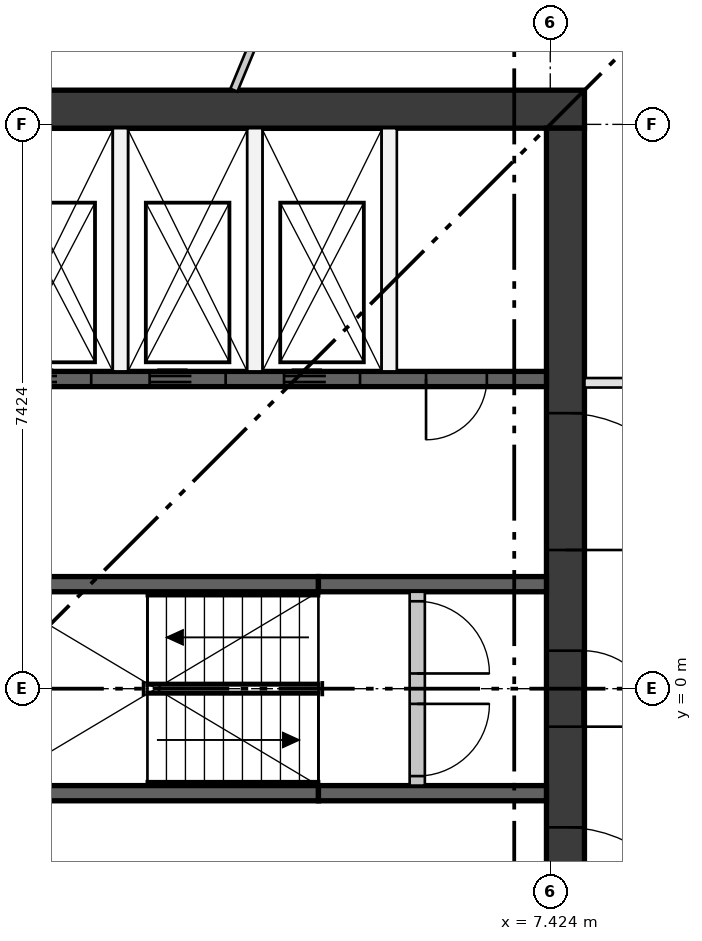
"""IFC4 building model, lengths in metres.
Left out: names, types, materials, properties, quantities, classifications, styles, units other than length and angle.
Written with IfcOpenShell. Run it as: python <this file> out.ifc"""

import sys

from ifc_helpers import new_model, si_unit, direction, frame, frame_2d, origin, place, context, subcontext, project, spatial, rectangle, extrude, element, fill, save


model = new_model("IFC4")
c1 = context("Model", 3, precision=1e-05, world=origin(), true_north=direction((0.0, 1.0)))
c2 = subcontext(c1, "Body", "Model", "MODEL_VIEW")
j1 = project(units=[si_unit("LENGTHUNIT", "METRE"), si_unit("PLANEANGLEUNIT", "RADIAN")], contexts=[c1])
p1 = place(None, origin())
s1 = spatial("IfcSite", under=j1, at=p1, CompositionType="ELEMENT")
p2 = place(p1, origin())
s2 = spatial("IfcBuilding", under=s1, at=p2, CompositionType="ELEMENT")
p3 = place(p2, frame((0.0, 0.0, 174.25)))
s3 = spatial("IfcBuildingStorey", under=s2, at=p3, CompositionType="ELEMENT", Elevation=174.25)
p4 = place(p3, frame((-7.874, 7.624, 0.0), z_axis=(0.0, 0.0, 1.0), x_axis=(1.0, 0.0, 0.0)))
e1 = element("IfcWall", 1, at=p4, inside=s3, PredefinedType="SHEAR", context=c2, shape_type="SweptSolid", body=[
    extrude(rectangle(XDim=15.748, YDim=0.5, at=frame_2d((7.874, 0.0))), origin(), (0.0, 0.0, 1.0), 3.35),
])
p5 = place(p3, frame((7.624, -7.374, 0.0), z_axis=(0.0, 0.0, 1.0), x_axis=(0.0, 1.0, 0.0)))
e2 = element("IfcWall", 2, at=p5, inside=s3, PredefinedType="SHEAR", context=c2, shape_type="SweptSolid", body=[
    extrude(rectangle(XDim=14.748, YDim=0.5, at=frame_2d((7.374, 0.0))), origin(), (0.0, 0.0, 1.0), 3.35),
])
p6 = place(p5, frame((6.874, 0.0, 0.0)))
e3 = element("IfcOpeningElement", 3, at=p6, cuts=e2, PredefinedType="OPENING", context=c2, shape_type="SweptSolid", body=[
    extrude(rectangle(XDim=1.0, YDim=2.1, at=frame_2d((0.5, 1.05))), frame((0.0, 0.26, 0.0), z_axis=(0.0, -1.0, 0.0), x_axis=(1.0, 0.0, 0.0)), (0.0, 0.0, 1.0), 0.52),
])
p7 = place(p5, frame((3.75, 0.0, 0.0)))
e4 = element("IfcOpeningElement", 4, at=p7, cuts=e2, PredefinedType="OPENING", context=c2, shape_type="SweptSolid", body=[
    extrude(rectangle(XDim=1.8, YDim=2.1, at=frame_2d((0.9, 1.05))), frame((0.0, 0.26, 0.0), z_axis=(0.0, -1.0, 0.0), x_axis=(1.0, 0.0, 0.0)), (0.0, 0.0, 1.0), 0.52),
])
p8 = place(p5, frame((9.198, 0.0, 0.0)))
e5 = element("IfcOpeningElement", 5, at=p8, cuts=e2, PredefinedType="OPENING", context=c2, shape_type="SweptSolid", body=[
    extrude(rectangle(XDim=1.8, YDim=2.1, at=frame_2d((0.9, 1.05))), frame((0.0, 0.26, 0.0), z_axis=(0.0, -1.0, 0.0), x_axis=(1.0, 0.0, 0.0)), (0.0, 0.0, 1.0), 0.52),
])
p9 = place(p3, frame((0.0, 4.074, 0.0), z_axis=(0.0, 0.0, 1.0), x_axis=(1.0, 0.0, 0.0)))
e6 = element("IfcWall", 6, at=p9, inside=s3, PredefinedType="SHEAR", context=c2, shape_type="SweptSolid", body=[
    extrude(rectangle(XDim=7.374, YDim=0.2, at=frame_2d((3.687, 0.0))), origin(), (0.0, 0.0, 1.0), 3.0),
])
p10 = place(p9, frame((0.384, 0.0, 0.0)))
e7 = element("IfcOpeningElement", 7, at=p10, cuts=e6, PredefinedType="OPENING", context=c2, shape_type="SweptSolid", body=[
    extrude(rectangle(XDim=1.0, YDim=2.1, at=frame_2d((0.5, 1.05))), frame((0.0, 0.11, 0.0), z_axis=(0.0, -1.0, 0.0), x_axis=(1.0, 0.0, 0.0)), (0.0, 0.0, 1.0), 0.22),
])
p11 = place(p9, frame((2.153, 0.0, 0.0)))
e8 = element("IfcOpeningElement", 8, at=p11, cuts=e6, PredefinedType="OPENING", context=c2, shape_type="SweptSolid", body=[
    extrude(rectangle(XDim=1.0, YDim=2.1, at=frame_2d((0.5, 1.05))), frame((0.0, 0.11, 0.0), z_axis=(0.0, -1.0, 0.0), x_axis=(1.0, 0.0, 0.0)), (0.0, 0.0, 1.0), 0.22),
])
p12 = place(p9, frame((3.921, 0.0, 0.0)))
e9 = element("IfcOpeningElement", 9, at=p12, cuts=e6, PredefinedType="OPENING", context=c2, shape_type="SweptSolid", body=[
    extrude(rectangle(XDim=1.0, YDim=2.1, at=frame_2d((0.5, 1.05))), frame((0.0, 0.11, 0.0), z_axis=(0.0, -1.0, 0.0), x_axis=(1.0, 0.0, 0.0)), (0.0, 0.0, 1.0), 0.22),
])
p13 = place(p9, frame((5.79, 0.0, 0.0)))
e10 = element("IfcOpeningElement", 10, at=p13, cuts=e6, PredefinedType="OPENING", context=c2, shape_type="SweptSolid", body=[
    extrude(rectangle(XDim=0.8, YDim=2.1, at=frame_2d((0.4, 1.05))), frame((0.0, 0.11, 0.0), z_axis=(0.0, -1.0, 0.0), x_axis=(1.0, 0.0, 0.0)), (0.0, 0.0, 1.0), 0.22),
])
p14 = place(p3, frame((0.0, -1.375, 0.0), z_axis=(0.0, 0.0, 1.0), x_axis=(1.0, 0.0, 0.0)))
e11 = element("IfcWall", 11, at=p14, inside=s3, PredefinedType="SHEAR", context=c2, shape_type="SweptSolid", body=[
    extrude(rectangle(XDim=4.374, YDim=0.2, at=frame_2d((2.187, 0.0))), origin(), (0.0, 0.0, 1.0), 3.0),
])
p15 = place(p3, frame((4.374, -1.375, 0.0), z_axis=(0.0, 0.0, 1.0), x_axis=(1.0, 0.0, 0.0)))
e12 = element("IfcWall", 12, at=p15, inside=s3, PredefinedType="SHEAR", context=c2, shape_type="SweptSolid", body=[
    extrude(rectangle(XDim=3.0, YDim=0.2, at=frame_2d((1.5, 0.0))), origin(), (0.0, 0.0, 1.0), 3.0),
])
p16 = place(p3, frame((0.0, 1.375, 0.0), z_axis=(0.0, 0.0, 1.0), x_axis=(1.0, 0.0, 0.0)))
e13 = element("IfcWall", 13, at=p16, inside=s3, PredefinedType="SHEAR", context=c2, shape_type="SweptSolid", body=[
    extrude(rectangle(XDim=4.374, YDim=0.2, at=frame_2d((2.187, 0.0))), origin(), (0.0, 0.0, 1.0), 3.0),
])
p17 = place(p3, frame((4.374, 1.375, 0.0), z_axis=(0.0, 0.0, 1.0), x_axis=(1.0, 0.0, 0.0)))
e14 = element("IfcWall", 14, at=p17, inside=s3, PredefinedType="SHEAR", context=c2, shape_type="SweptSolid", body=[
    extrude(rectangle(XDim=3.0, YDim=0.2, at=frame_2d((1.5, 0.0))), origin(), (0.0, 0.0, 1.0), 3.0),
])
for number, where, z_axis, x_axis in (
    (15, (1.769, 4.174, 0.0), (0.0, 0.0, 1.0), (0.0, 1.0, 0.0)),
    (16, (3.537, 4.174, 0.0), (0.0, 0.0, 1.0), (0.0, 1.0, 0.0)),
    (17, (5.305, 4.174, 0.0), (0.0, 0.0, 1.0), (0.0, 1.0, 0.0)),
):
    element("IfcWall", number, at=place(p3, frame(where, z_axis=z_axis, x_axis=x_axis)), inside=s3, PredefinedType="PARTITIONING", context=c2, shape_type="SweptSolid", body=[
        extrude(rectangle(XDim=3.2, YDim=0.2, at=frame_2d((1.6, 0.0))), origin(), (0.0, 0.0, 1.0), 3.0),
    ])
p18 = place(p3, frame((5.674, -1.275, 0.0), z_axis=(0.0, 0.0, 1.0), x_axis=(0.0, 1.0, 0.0)))
e18 = element("IfcWall", 18, at=p18, inside=s3, PredefinedType="PARTITIONING", context=c2, shape_type="SweptSolid", body=[
    extrude(rectangle(XDim=2.55, YDim=0.2, at=frame_2d((1.275, 0.0))), origin(), (0.0, 0.0, 1.0), 3.0),
])
p19 = place(p18, frame((0.125, 0.0, 0.0)))
e19 = element("IfcOpeningElement", 19, at=p19, cuts=e18, PredefinedType="OPENING", context=c2, shape_type="SweptSolid", body=[
    extrude(rectangle(XDim=0.95, YDim=2.1, at=frame_2d((0.475, 1.05))), frame((0.0, 0.11, 0.0), z_axis=(0.0, -1.0, 0.0), x_axis=(1.0, 0.0, 0.0)), (0.0, 0.0, 1.0), 0.22),
])
p20 = place(p18, frame((1.475, 0.0, 0.0)))
e20 = element("IfcOpeningElement", 20, at=p20, cuts=e18, PredefinedType="OPENING", context=c2, shape_type="SweptSolid", body=[
    extrude(rectangle(XDim=0.95, YDim=2.1, at=frame_2d((0.475, 1.05))), frame((0.0, 0.11, 0.0), z_axis=(0.0, -1.0, 0.0), x_axis=(1.0, 0.0, 0.0)), (0.0, 0.0, 1.0), 0.22),
])
p21 = place(p3, frame((7.874, 4.024, 0.0), z_axis=(0.0, 0.0, 1.0), x_axis=(1.0, 0.0, 0.0)))
e21 = element("IfcWall", 21, at=p21, inside=s3, PredefinedType="PARTITIONING", context=c2, shape_type="SweptSolid", body=[
    extrude(rectangle(XDim=4.741, YDim=0.125, at=frame_2d((2.37, 0.0))), origin(), (0.0, 0.0, 1.0), 3.0),
])
p22 = place(p21, frame((1.5, 0.0, 0.0)))
e22 = element("IfcOpeningElement", 22, at=p22, cuts=e21, PredefinedType="OPENING", context=c2, shape_type="SweptSolid", body=[
    extrude(rectangle(XDim=1.8, YDim=2.1, at=frame_2d((0.9, 1.05))), frame((0.0, 0.073, 0.0), z_axis=(0.0, -1.0, 0.0), x_axis=(1.0, 0.0, 0.0)), (0.0, 0.0, 1.0), 0.145),
])
p23 = place(p3, frame((3.261, 7.874, 0.0), z_axis=(0.0, 0.0, 1.0), x_axis=(0.382690105068, 0.923876768559, 0.0)))
e23 = element("IfcWall", 23, at=p23, inside=s3, PredefinedType="PARTITIONING", context=c2, shape_type="SweptSolid", body=[
    extrude(rectangle(XDim=5.927, YDim=0.1, at=frame_2d((2.964, 0.0))), origin(), (0.0, 0.0, 1.0), 3.0),
])
p24 = place(p23, frame((2.5, 0.0, 0.0)))
e24 = element("IfcOpeningElement", 24, at=p24, cuts=e23, PredefinedType="OPENING", context=c2, shape_type="SweptSolid", body=[
    extrude(rectangle(XDim=1.0, YDim=2.1, at=frame_2d((0.5, 1.05))), frame((0.0, 0.06, 0.0), z_axis=(0.0, -1.0, 0.0), x_axis=(1.0, 0.0, 0.0)), (0.0, 0.0, 1.0), 0.12),
])
p25 = place(p10, frame((1.0, 0.0, 0.0), z_axis=(0.0, 0.0, 1.0), x_axis=(-1.0, 0.0, 0.0)))
e25 = element("IfcDoor", 25, at=p25, inside=s3, OperationType="DOUBLE_DOOR_SLIDING", PredefinedType="DOOR", context=c2, shape_type="SweptSolid", body=[
    extrude(rectangle(XDim=1.0, YDim=2.1, at=frame_2d((0.5, 1.05))), frame((0.0, 0.025, 0.0), z_axis=(0.0, -1.0, 0.0), x_axis=(1.0, 0.0, 0.0)), (0.0, 0.0, 1.0), 0.05),
])
fill(e7, e25)
p26 = place(p11, frame((1.0, 0.0, 0.0), z_axis=(0.0, 0.0, 1.0), x_axis=(-1.0, 0.0, 0.0)))
e26 = element("IfcDoor", 26, at=p26, inside=s3, OperationType="DOUBLE_DOOR_SLIDING", PredefinedType="DOOR", context=c2, shape_type="SweptSolid", body=[
    extrude(rectangle(XDim=1.0, YDim=2.1, at=frame_2d((0.5, 1.05))), frame((0.0, 0.025, 0.0), z_axis=(0.0, -1.0, 0.0), x_axis=(1.0, 0.0, 0.0)), (0.0, 0.0, 1.0), 0.05),
])
fill(e8, e26)
p27 = place(p12, frame((1.0, 0.0, 0.0), z_axis=(0.0, 0.0, 1.0), x_axis=(-1.0, 0.0, 0.0)))
e27 = element("IfcDoor", 27, at=p27, inside=s3, OperationType="DOUBLE_DOOR_SLIDING", PredefinedType="DOOR", context=c2, shape_type="SweptSolid", body=[
    extrude(rectangle(XDim=1.0, YDim=2.1, at=frame_2d((0.5, 1.05))), frame((0.0, 0.025, 0.0), z_axis=(0.0, -1.0, 0.0), x_axis=(1.0, 0.0, 0.0)), (0.0, 0.0, 1.0), 0.05),
])
fill(e9, e27)
p28 = place(p19, frame((0.95, 0.0, 0.0), z_axis=(0.0, 0.0, 1.0), x_axis=(-1.0, 0.0, 0.0)))
e28 = element("IfcDoor", 28, at=p28, inside=s3, OperationType="SINGLE_SWING_RIGHT", PredefinedType="DOOR", context=c2, shape_type="SweptSolid", body=[
    extrude(rectangle(XDim=0.95, YDim=2.1, at=frame_2d((0.475, 1.05))), frame((0.0, 0.025, 0.0), z_axis=(0.0, -1.0, 0.0), x_axis=(1.0, 0.0, 0.0)), (0.0, 0.0, 1.0), 0.05),
])
fill(e19, e28)
p29 = place(p20, frame((0.95, 0.0, 0.0), z_axis=(0.0, 0.0, 1.0), x_axis=(-1.0, 0.0, 0.0)))
e29 = element("IfcDoor", 29, at=p29, inside=s3, OperationType="SINGLE_SWING_LEFT", PredefinedType="DOOR", context=c2, shape_type="SweptSolid", body=[
    extrude(rectangle(XDim=0.95, YDim=2.1, at=frame_2d((0.475, 1.05))), frame((0.0, 0.025, 0.0), z_axis=(0.0, -1.0, 0.0), x_axis=(1.0, 0.0, 0.0)), (0.0, 0.0, 1.0), 0.05),
])
fill(e20, e29)
p30 = place(p13, frame((0.8, 0.0, 0.0), z_axis=(0.0, 0.0, 1.0), x_axis=(-1.0, 0.0, 0.0)))
e30 = element("IfcDoor", 30, at=p30, inside=s3, OperationType="SINGLE_SWING_LEFT", PredefinedType="DOOR", context=c2, shape_type="SweptSolid", body=[
    extrude(rectangle(XDim=0.8, YDim=2.1, at=frame_2d((0.4, 1.05))), frame((0.0, 0.025, 0.0), z_axis=(0.0, -1.0, 0.0), x_axis=(1.0, 0.0, 0.0)), (0.0, 0.0, 1.0), 0.05),
])
fill(e10, e30)
p31 = place(p6, frame((1.0, 0.0, 0.0), z_axis=(0.0, 0.0, 1.0), x_axis=(-1.0, 0.0, 0.0)))
e31 = element("IfcDoor", 31, at=p31, inside=s3, OperationType="SINGLE_SWING_LEFT", PredefinedType="DOOR", context=c2, shape_type="SweptSolid", body=[
    extrude(rectangle(XDim=1.0, YDim=2.1, at=frame_2d((0.5, 1.05))), frame((0.0, 0.25, 0.0), z_axis=(0.0, -1.0, 0.0), x_axis=(1.0, 0.0, 0.0)), (0.0, 0.0, 1.0), 0.05),
])
fill(e3, e31)
p32 = place(p7, frame((1.8, 0.0, 0.0), z_axis=(0.0, 0.0, 1.0), x_axis=(-1.0, 0.0, 0.0)))
e32 = element("IfcDoor", 32, at=p32, inside=s3, OperationType="DOUBLE_DOOR_SINGLE_SWING", PredefinedType="DOOR", context=c2, shape_type="SweptSolid", body=[
    extrude(rectangle(XDim=1.8, YDim=2.1, at=frame_2d((0.9, 1.05))), frame((0.0, 0.025, 0.0), z_axis=(0.0, -1.0, 0.0), x_axis=(1.0, 0.0, 0.0)), (0.0, 0.0, 1.0), 0.05),
])
fill(e4, e32)
p33 = place(p8, frame((1.8, 0.0, 0.0), z_axis=(0.0, 0.0, 1.0), x_axis=(-1.0, 0.0, 0.0)))
e33 = element("IfcDoor", 33, at=p33, inside=s3, OperationType="DOUBLE_DOOR_SINGLE_SWING", PredefinedType="DOOR", context=c2, shape_type="SweptSolid", body=[
    extrude(rectangle(XDim=1.8, YDim=2.1, at=frame_2d((0.9, 1.05))), frame((0.0, 0.025, 0.0), z_axis=(0.0, -1.0, 0.0), x_axis=(1.0, 0.0, 0.0)), (0.0, 0.0, 1.0), 0.05),
])
fill(e5, e33)
save(model, sys.argv[1])
